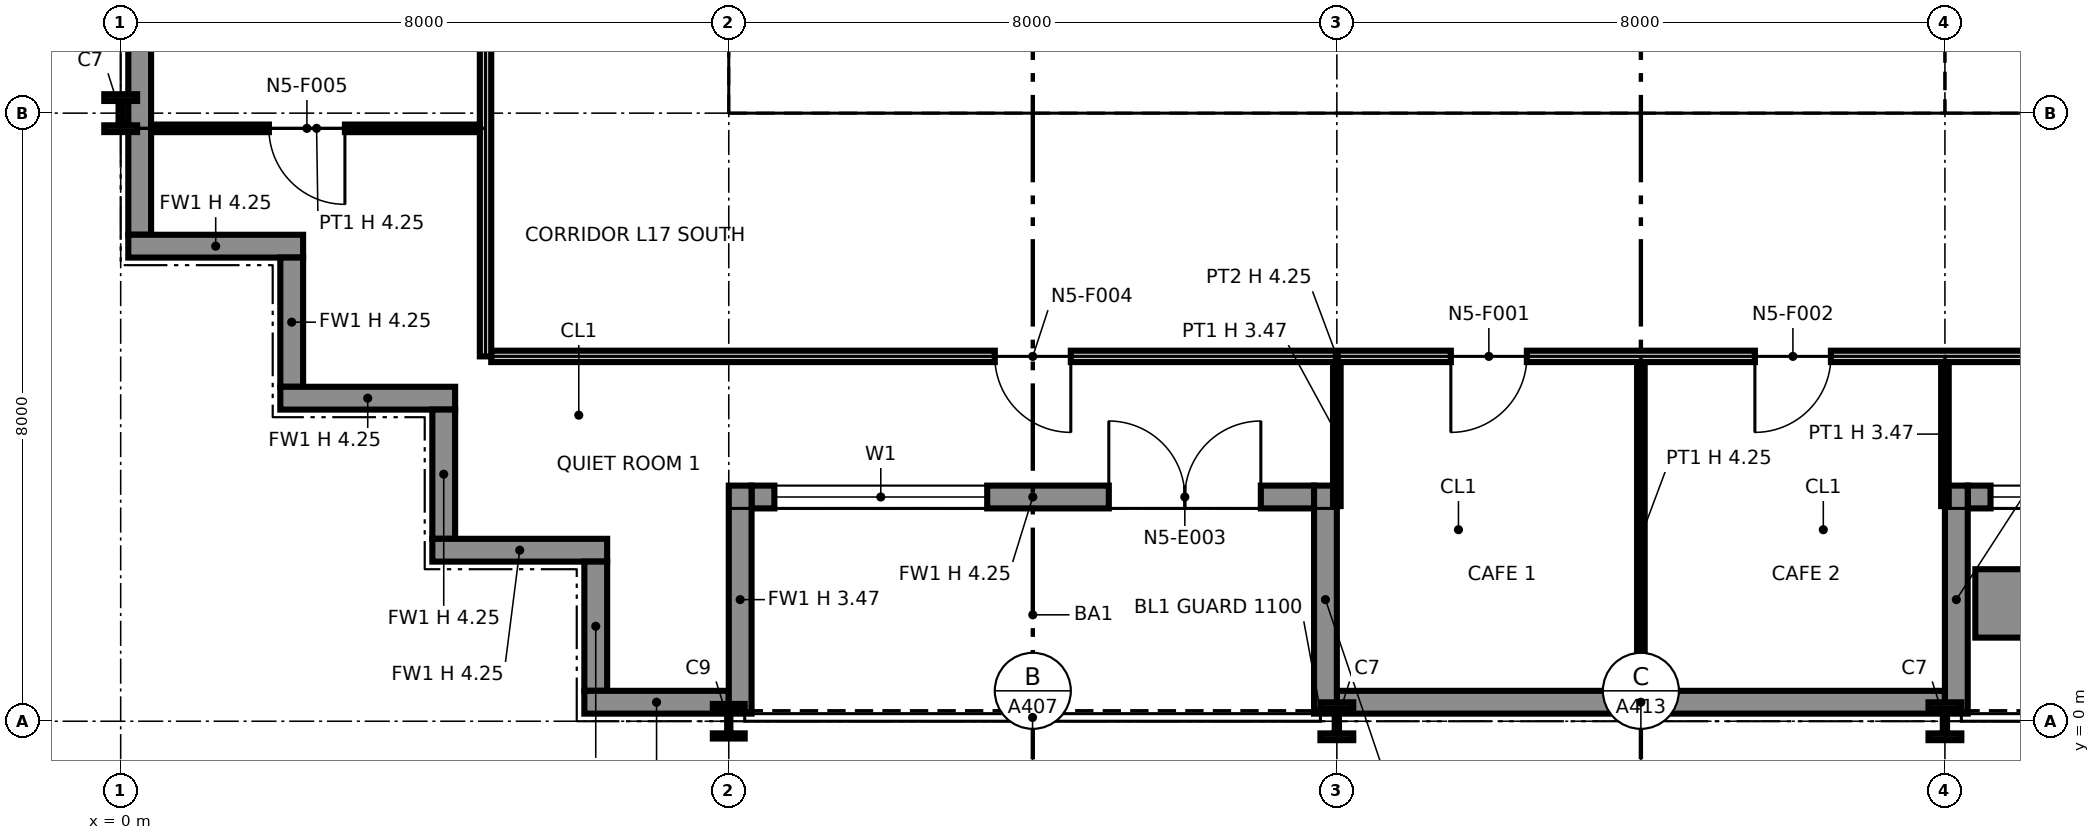
"""IFC4 building model, lengths in metres.
Left out: names, types, materials, properties, quantities, classifications, styles, units other than length and angle.
Written with IfcOpenShell. Run it as: python <this file> out.ifc"""

import sys

from ifc_helpers import new_model, si_unit, direction, frame, frame_2d, origin, origin_2d, place, context, subcontext, project, spatial, polyline, rectangle, i_section, outline, extrude, element, fill, save


model = new_model("IFC4")
c1 = context("Model", 3, precision=1e-05, world=origin(), true_north=direction((0.0, 1.0)))
c2 = subcontext(c1, "Body", "Model", "MODEL_VIEW")
j1 = project(units=[si_unit("LENGTHUNIT", "METRE"), si_unit("PLANEANGLEUNIT", "RADIAN")], contexts=[c1])
p1 = place(None, origin())
s1 = spatial("IfcSite", under=j1, at=p1, CompositionType="ELEMENT")
p2 = place(p1, origin())
s2 = spatial("IfcBuilding", under=s1, at=p2, CompositionType="ELEMENT")
p3 = place(p2, frame((0.0, 0.0, 92.0)))
s3 = spatial("IfcBuildingStorey", under=s2, at=p3, CompositionType="ELEMENT", Elevation=92.0)
p4 = place(p3, frame((0.0, 8.0, 0.0), z_axis=(0.0, 0.0, 1.0), x_axis=(1.0, 0.0, 0.0)))
e1 = element("IfcColumn", 1, at=p4, inside=s3, PredefinedType="COLUMN", context=c2, shape_type="SweptSolid", body=[
    extrude(i_section(OverallWidth=0.432, OverallDepth=0.498, WebThickness=0.056, FlangeThickness=0.089, at=origin_2d()), origin(), (0.0, 0.0, 1.0), 4.25),
])
p5 = place(p3, frame((8.0, 0.0, 0.0), z_axis=(0.0, 0.0, 1.0), x_axis=(1.0, 0.0, 0.0)))
e2 = element("IfcColumn", 2, at=p5, inside=s3, PredefinedType="COLUMN", context=c2, shape_type="SweptSolid", body=[
    extrude(i_section(OverallWidth=0.419, OverallDepth=0.455, WebThickness=0.042, FlangeThickness=0.068, at=origin_2d()), origin(), (0.0, 0.0, 1.0), 4.25),
])
p6 = place(p3, frame((8.0, 8.0, 0.0), z_axis=(0.0, 0.0, 1.0), x_axis=(1.0, 0.0, 0.0)))
e3 = element("IfcColumn", 3, at=p6, inside=s3, PredefinedType="COLUMN", context=c2, shape_type="SweptSolid", body=[
    extrude(i_section(OverallWidth=0.406, OverallDepth=0.417, WebThickness=0.03, FlangeThickness=0.048, at=origin_2d()), origin(), (0.0, 0.0, 1.0), 4.25),
])
p7 = place(p3, frame((16.0, 0.0, 0.0), z_axis=(0.0, 0.0, 1.0), x_axis=(1.0, 0.0, 0.0)))
e4 = element("IfcColumn", 4, at=p7, inside=s3, PredefinedType="COLUMN", context=c2, shape_type="SweptSolid", body=[
    extrude(i_section(OverallWidth=0.432, OverallDepth=0.498, WebThickness=0.056, FlangeThickness=0.089, at=origin_2d()), origin(), (0.0, 0.0, 1.0), 4.25),
])
p8 = place(p3, frame((16.0, 8.0, 0.0), z_axis=(0.0, 0.0, 1.0), x_axis=(1.0, 0.0, 0.0)))
e5 = element("IfcColumn", 5, at=p8, inside=s3, PredefinedType="COLUMN", context=c2, shape_type="SweptSolid", body=[
    extrude(i_section(OverallWidth=0.406, OverallDepth=0.417, WebThickness=0.03, FlangeThickness=0.048, at=origin_2d()), origin(), (0.0, 0.0, 1.0), 4.25),
])
p9 = place(p3, frame((24.0, 0.0, 0.0), z_axis=(0.0, 0.0, 1.0), x_axis=(1.0, 0.0, 0.0)))
e6 = element("IfcColumn", 6, at=p9, inside=s3, PredefinedType="COLUMN", context=c2, shape_type="SweptSolid", body=[
    extrude(i_section(OverallWidth=0.432, OverallDepth=0.498, WebThickness=0.056, FlangeThickness=0.089, at=origin_2d()), origin(), (0.0, 0.0, 1.0), 4.25),
])
p10 = place(p3, frame((24.0, 8.0, 0.0), z_axis=(0.0, 0.0, 1.0), x_axis=(1.0, 0.0, 0.0)))
e7 = element("IfcColumn", 7, at=p10, inside=s3, PredefinedType="COLUMN", context=c2, shape_type="SweptSolid", body=[
    extrude(i_section(OverallWidth=0.411, OverallDepth=0.434, WebThickness=0.036, FlangeThickness=0.057, at=origin_2d()), origin(), (0.0, 0.0, 1.0), 4.25),
])
p11 = place(p3, frame((0.25, 16.0, 0.0), z_axis=(0.0, 0.0, 1.0), x_axis=(0.0, -1.0, 0.0)))
e8 = element("IfcWall", 8, at=p11, inside=s3, PredefinedType="SOLIDWALL", context=c2, shape_type="SweptSolid", body=[
    extrude(rectangle(XDim=9.6, YDim=0.3, at=frame_2d((4.8, 0.0))), origin(), (0.0, 0.0, 1.0), 4.25),
])
p12 = place(p3, frame((0.1, 6.25, 0.0), z_axis=(0.0, 0.0, 1.0), x_axis=(1.0, 0.0, 0.0)))
e9 = element("IfcWall", 9, at=p12, inside=s3, PredefinedType="SOLIDWALL", context=c2, shape_type="SweptSolid", body=[
    extrude(rectangle(XDim=2.3, YDim=0.3, at=frame_2d((1.15, 0.0))), origin(), (0.0, 0.0, 1.0), 4.25),
])
p13 = place(p3, frame((2.25, 6.1, 0.0), z_axis=(0.0, 0.0, 1.0), x_axis=(0.0, -1.0, 0.0)))
e10 = element("IfcWall", 10, at=p13, inside=s3, PredefinedType="SOLIDWALL", context=c2, shape_type="SweptSolid", body=[
    extrude(rectangle(XDim=1.7, YDim=0.3, at=frame_2d((0.85, 0.0))), origin(), (0.0, 0.0, 1.0), 4.25),
])
p14 = place(p3, frame((2.1, 4.25, 0.0), z_axis=(0.0, 0.0, 1.0), x_axis=(1.0, 0.0, 0.0)))
e11 = element("IfcWall", 11, at=p14, inside=s3, PredefinedType="SOLIDWALL", context=c2, shape_type="SweptSolid", body=[
    extrude(rectangle(XDim=2.3, YDim=0.3, at=frame_2d((1.15, 0.0))), origin(), (0.0, 0.0, 1.0), 4.25),
])
p15 = place(p3, frame((4.25, 4.1, 0.0), z_axis=(0.0, 0.0, 1.0), x_axis=(0.0, -1.0, 0.0)))
e12 = element("IfcWall", 12, at=p15, inside=s3, PredefinedType="SOLIDWALL", context=c2, shape_type="SweptSolid", body=[
    extrude(rectangle(XDim=1.7, YDim=0.3, at=frame_2d((0.85, 0.0))), origin(), (0.0, 0.0, 1.0), 4.25),
])
p16 = place(p3, frame((4.1, 2.25, 0.0), z_axis=(0.0, 0.0, 1.0), x_axis=(1.0, 0.0, 0.0)))
e13 = element("IfcWall", 13, at=p16, inside=s3, PredefinedType="SOLIDWALL", context=c2, shape_type="SweptSolid", body=[
    extrude(rectangle(XDim=2.3, YDim=0.3, at=frame_2d((1.15, 0.0))), origin(), (0.0, 0.0, 1.0), 4.25),
])
p17 = place(p3, frame((6.25, 2.1, 0.0), z_axis=(0.0, 0.0, 1.0), x_axis=(0.0, -1.0, 0.0)))
e14 = element("IfcWall", 14, at=p17, inside=s3, PredefinedType="SOLIDWALL", context=c2, shape_type="SweptSolid", body=[
    extrude(rectangle(XDim=1.7, YDim=0.3, at=frame_2d((0.85, 0.0))), origin(), (0.0, 0.0, 1.0), 4.25),
])
p18 = place(p3, frame((6.1, 0.25, 0.0), z_axis=(0.0, 0.0, 1.0), x_axis=(1.0, 0.0, 0.0)))
e15 = element("IfcWall", 15, at=p18, inside=s3, PredefinedType="SOLIDWALL", context=c2, shape_type="SweptSolid", body=[
    extrude(rectangle(XDim=1.9, YDim=0.3, at=frame_2d((0.95, 0.0))), origin(), (0.0, 0.0, 1.0), 4.25),
])
p19 = place(p3, frame((8.3, 2.95, 0.0), z_axis=(0.0, 0.0, 1.0), x_axis=(1.0, 0.0, 0.0)))
e16 = element("IfcWall", 16, at=p19, inside=s3, PredefinedType="SOLIDWALL", context=c2, shape_type="SweptSolid", body=[
    extrude(rectangle(XDim=7.4, YDim=0.3, at=frame_2d((3.7, 0.0))), origin(), (0.0, 0.0, 1.0), 4.25),
])
p20 = place(p19, frame((0.3, 0.0, 0.9)))
e17 = element("IfcOpeningElement", 17, at=p20, cuts=e16, PredefinedType="OPENING", context=c2, shape_type="SweptSolid", body=[
    extrude(rectangle(XDim=2.8, YDim=2.2, at=frame_2d((1.4, 1.1))), frame((0.0, 0.16, 0.0), z_axis=(0.0, -1.0, 0.0), x_axis=(1.0, 0.0, 0.0)), (0.0, 0.0, 1.0), 0.32),
])
p21 = place(p19, frame((4.7, 0.0, 0.0)))
e18 = element("IfcOpeningElement", 18, at=p21, cuts=e16, PredefinedType="OPENING", context=c2, shape_type="SweptSolid", body=[
    extrude(rectangle(XDim=2.0, YDim=2.4, at=frame_2d((1.0, 1.2))), frame((0.0, 0.16, 0.0), z_axis=(0.0, -1.0, 0.0), x_axis=(1.0, 0.0, 0.0)), (0.0, 0.0, 1.0), 0.32),
])
p22 = place(p3, frame((8.15, 0.1, 0.0), z_axis=(0.0, 0.0, 1.0), x_axis=(0.0, 1.0, 0.0)))
e19 = element("IfcWall", 19, at=p22, inside=s3, PredefinedType="SOLIDWALL", context=c2, shape_type="SweptSolid", body=[
    extrude(rectangle(XDim=3.0, YDim=0.3, at=frame_2d((1.5, 0.0))), origin(), (0.0, 0.0, 1.0), 3.469),
])
p23 = place(p3, frame((15.85, 0.1, 0.0), z_axis=(0.0, 0.0, 1.0), x_axis=(0.0, 1.0, 0.0)))
e20 = element("IfcWall", 20, at=p23, inside=s3, PredefinedType="SOLIDWALL", context=c2, shape_type="SweptSolid", body=[
    extrude(rectangle(XDim=3.0, YDim=0.3, at=frame_2d((1.5, 0.0))), origin(), (0.0, 0.0, 1.0), 3.556),
])
p24 = place(p3, frame((16.0, 0.25, 0.0), z_axis=(0.0, 0.0, 1.0), x_axis=(1.0, 0.0, 0.0)))
e21 = element("IfcWall", 21, at=p24, inside=s3, PredefinedType="SOLIDWALL", context=c2, shape_type="SweptSolid", body=[
    extrude(rectangle(XDim=8.0, YDim=0.3, at=frame_2d((4.0, 0.0))), origin(), (0.0, 0.0, 1.0), 4.25),
])
p25 = place(p3, frame((24.3, 2.95, 0.0), z_axis=(0.0, 0.0, 1.0), x_axis=(1.0, 0.0, 0.0)))
e22 = element("IfcWall", 22, at=p25, inside=s3, PredefinedType="SOLIDWALL", context=c2, shape_type="SweptSolid", body=[
    extrude(rectangle(XDim=7.4, YDim=0.3, at=frame_2d((3.7, 0.0))), origin(), (0.0, 0.0, 1.0), 4.25),
])
p26 = place(p25, frame((0.3, 0.0, 0.9)))
e23 = element("IfcOpeningElement", 23, at=p26, cuts=e22, PredefinedType="OPENING", context=c2, shape_type="SweptSolid", body=[
    extrude(rectangle(XDim=2.8, YDim=2.2, at=frame_2d((1.4, 1.1))), frame((0.0, 0.16, 0.0), z_axis=(0.0, -1.0, 0.0), x_axis=(1.0, 0.0, 0.0)), (0.0, 0.0, 1.0), 0.32),
])
p27 = place(p25, frame((4.7, 0.0, 0.0)))
e24 = element("IfcOpeningElement", 24, at=p27, cuts=e22, PredefinedType="OPENING", context=c2, shape_type="SweptSolid", body=[
    extrude(rectangle(XDim=2.0, YDim=2.4, at=frame_2d((1.0, 1.2))), frame((0.0, 0.16, 0.0), z_axis=(0.0, -1.0, 0.0), x_axis=(1.0, 0.0, 0.0)), (0.0, 0.0, 1.0), 0.32),
])
p28 = place(p3, frame((24.15, 0.1, 0.0), z_axis=(0.0, 0.0, 1.0), x_axis=(0.0, 1.0, 0.0)))
e25 = element("IfcWall", 25, at=p28, inside=s3, PredefinedType="SOLIDWALL", context=c2, shape_type="SweptSolid", body=[
    extrude(rectangle(XDim=3.0, YDim=0.3, at=frame_2d((1.5, 0.0))), origin(), (0.0, 0.0, 1.0), 3.556),
])
p29 = place(p3, frame((24.4, 1.55, 0.0), z_axis=(0.0, 0.0, 1.0), x_axis=(1.0, 0.0, 0.0)))
e26 = element("IfcWall", 26, at=p29, inside=s3, PredefinedType="SOLIDWALL", context=c2, shape_type="SweptSolid", body=[
    extrude(rectangle(XDim=3.2, YDim=0.9, at=frame_2d((1.6, 0.0))), origin(), (0.0, 0.0, 1.0), 0.6),
])
p30 = place(p3, frame((8.65, 8.75, 0.0), z_axis=(0.0, 0.0, 1.0), x_axis=(1.0, 0.0, 0.0)))
e27 = element("IfcWall", 27, at=p30, inside=s3, PredefinedType="PARTITIONING", context=c2, shape_type="SweptSolid", body=[
    extrude(outline(polyline([(0.0, 0.0), (14.7, 0.0), (14.7, 4.25), (7.469, 4.25), (7.469, 3.632), (7.231, 3.632), (7.23, 4.25), (0.0, 4.25), (0.0, 0.0)])), frame((0.0, 0.1, 0.0), z_axis=(0.0, -1.0, 0.0), x_axis=(1.0, 0.0, 0.0)), (0.0, 0.0, 1.0), 0.2),
])
p31 = place(p30, frame((1.3, 0.0, 0.0)))
e28 = element("IfcOpeningElement", 28, at=p31, cuts=e27, PredefinedType="OPENING", context=c2, shape_type="SweptSolid", body=[
    extrude(rectangle(XDim=1.4, YDim=2.1, at=frame_2d((0.7, 1.05))), frame((0.0, 0.11, 0.0), z_axis=(0.0, -1.0, 0.0), x_axis=(1.0, 0.0, 0.0)), (0.0, 0.0, 1.0), 0.22),
])
p32 = place(p30, frame((4.6, 0.0, 0.0)))
e29 = element("IfcOpeningElement", 29, at=p32, cuts=e27, PredefinedType="OPENING", context=c2, shape_type="SweptSolid", body=[
    extrude(rectangle(XDim=1.4, YDim=2.1, at=frame_2d((0.7, 1.05))), frame((0.0, 0.11, 0.0), z_axis=(0.0, -1.0, 0.0), x_axis=(1.0, 0.0, 0.0)), (0.0, 0.0, 1.0), 0.22),
])
p33 = place(p30, frame((10.4, 0.0, 0.0)))
e30 = element("IfcOpeningElement", 30, at=p33, cuts=e27, PredefinedType="OPENING", context=c2, shape_type="SweptSolid", body=[
    extrude(rectangle(XDim=1.2, YDim=2.1, at=frame_2d((0.6, 1.05))), frame((0.0, 0.11, 0.0), z_axis=(0.0, -1.0, 0.0), x_axis=(1.0, 0.0, 0.0)), (0.0, 0.0, 1.0), 0.22),
])
p34 = place(p3, frame((24.65, 8.75, 0.0), z_axis=(0.0, 0.0, 1.0), x_axis=(1.0, 0.0, 0.0)))
e31 = element("IfcWall", 31, at=p34, inside=s3, PredefinedType="PARTITIONING", context=c2, shape_type="SweptSolid", body=[
    extrude(outline(polyline([(0.0, 0.0), (14.7, 0.0), (14.7, 4.25), (7.469, 4.25), (7.469, 3.632), (7.231, 3.632), (7.23, 4.25), (0.0, 4.25), (0.0, 0.0)])), frame((0.0, 0.1, 0.0), z_axis=(0.0, -1.0, 0.0), x_axis=(1.0, 0.0, 0.0)), (0.0, 0.0, 1.0), 0.2),
])
p35 = place(p3, frame((20.0, 0.13, 0.0), z_axis=(0.0, 0.0, 1.0), x_axis=(0.0, 1.0, 0.0)))
e32 = element("IfcWall", 32, at=p35, inside=s3, PredefinedType="PARTITIONING", context=c2, shape_type="SweptSolid", body=[
    extrude(outline(polyline([(0.0, 0.0), (4.595, 0.0), (4.595, 4.25), (4.17, 4.25), (4.168, 3.47), (3.572, 3.47), (3.57, 4.25), (0.0, 4.25), (0.0, 0.0)])), frame((0.0, 0.05, 0.0), z_axis=(0.0, -1.0, 0.0), x_axis=(1.0, 0.0, 0.0)), (0.0, 0.0, 1.0), 0.1),
])
for number, where, z_axis, x_axis in (
    (33, (16.0, 2.83, 0.0), (0.0, 0.0, 1.0), (0.0, 1.0, 0.0)),
    (34, (24.0, 2.83, 0.0), (0.0, 0.0, 1.0), (0.0, 1.0, 0.0)),
):
    element("IfcWall", number, at=place(p3, frame(where, z_axis=z_axis, x_axis=x_axis)), inside=s3, PredefinedType="PARTITIONING", context=c2, shape_type="SweptSolid", body=[
        extrude(rectangle(XDim=1.895, YDim=0.1, at=frame_2d((0.948, 0.0))), origin(), (0.0, 0.0, 1.0), 3.47),
    ])
p36 = place(p3, frame((4.875, 4.8, 0.0), z_axis=(0.0, 0.0, 1.0), x_axis=(1.0, 0.0, 0.0)))
e35 = element("IfcWall", 35, at=p36, inside=s3, PredefinedType="PARTITIONING", context=c2, shape_type="SweptSolid", body=[
    extrude(rectangle(XDim=22.25, YDim=0.15, at=frame_2d((11.125, 0.0))), origin(), (0.0, 0.0, 1.0), 4.25),
])
p37 = place(p36, frame((13.625, 0.0, 0.0), z_axis=(0.0, 0.0, 1.0), x_axis=(-1.0, 0.0, 0.0)))
e36 = element("IfcOpeningElement", 36, at=p37, cuts=e35, PredefinedType="OPENING", context=c2, shape_type="SweptSolid", body=[
    extrude(rectangle(XDim=1.0, YDim=2.1, at=frame_2d((0.5, 1.05))), frame((0.0, 0.085, 0.0), z_axis=(0.0, -1.0, 0.0), x_axis=(1.0, 0.0, 0.0)), (0.0, 0.0, 1.0), 0.17),
])
p38 = place(p36, frame((17.625, 0.0, 0.0), z_axis=(0.0, 0.0, 1.0), x_axis=(-1.0, 0.0, 0.0)))
e37 = element("IfcOpeningElement", 37, at=p38, cuts=e35, PredefinedType="OPENING", context=c2, shape_type="SweptSolid", body=[
    extrude(rectangle(XDim=1.0, YDim=2.1, at=frame_2d((0.5, 1.05))), frame((0.0, 0.085, 0.0), z_axis=(0.0, -1.0, 0.0), x_axis=(1.0, 0.0, 0.0)), (0.0, 0.0, 1.0), 0.17),
])
p39 = place(p36, frame((7.625, 0.0, 0.0), z_axis=(0.0, 0.0, 1.0), x_axis=(-1.0, 0.0, 0.0)))
e38 = element("IfcOpeningElement", 38, at=p39, cuts=e35, PredefinedType="OPENING", context=c2, shape_type="SweptSolid", body=[
    extrude(rectangle(XDim=1.0, YDim=2.1, at=frame_2d((0.5, 1.05))), frame((0.0, 0.085, 0.0), z_axis=(0.0, -1.0, 0.0), x_axis=(1.0, 0.0, 0.0)), (0.0, 0.0, 1.0), 0.17),
])
p40 = place(p3, frame((4.8, 4.8, 0.0), z_axis=(0.0, 0.0, 1.0), x_axis=(0.0, 1.0, 0.0)))
e39 = element("IfcWall", 39, at=p40, inside=s3, PredefinedType="PARTITIONING", context=c2, shape_type="SweptSolid", body=[
    extrude(outline(polyline([(0.0, 0.0), (14.575, 0.0), (14.575, 4.25), (11.5, 4.25), (11.498, 3.47), (10.902, 3.47), (10.9, 4.25), (7.5, 4.25), (7.498, 3.47), (6.902, 3.47), (6.9, 4.25), (3.5, 4.25), (3.498, 3.47), (2.902, 3.47), (2.9, 4.25), (0.0, 4.25), (0.0, 0.0)])), frame((0.0, 0.075, 0.0), z_axis=(0.0, -1.0, 0.0), x_axis=(1.0, 0.0, 0.0)), (0.0, 0.0, 1.0), 0.15),
])
p41 = place(p40, frame((12.425, 0.0, 0.0)))
e40 = element("IfcOpeningElement", 40, at=p41, cuts=e39, PredefinedType="OPENING", context=c2, shape_type="SweptSolid", body=[
    extrude(rectangle(XDim=1.0, YDim=2.1, at=frame_2d((0.5, 1.05))), frame((0.0, 0.085, 0.0), z_axis=(0.0, -1.0, 0.0), x_axis=(1.0, 0.0, 0.0)), (0.0, 0.0, 1.0), 0.17),
])
p42 = place(p3, frame((0.43, 7.8, 0.0), z_axis=(0.0, 0.0, 1.0), x_axis=(1.0, 0.0, 0.0)))
e41 = element("IfcWall", 41, at=p42, inside=s3, PredefinedType="PARTITIONING", context=c2, shape_type="SweptSolid", body=[
    extrude(rectangle(XDim=4.295, YDim=0.1, at=frame_2d((2.147, 0.0))), origin(), (0.0, 0.0, 1.0), 4.25),
])
p43 = place(p42, frame((2.52, 0.0, 0.0), z_axis=(0.0, 0.0, 1.0), x_axis=(-1.0, 0.0, 0.0)))
e42 = element("IfcOpeningElement", 42, at=p43, cuts=e41, PredefinedType="OPENING", context=c2, shape_type="SweptSolid", body=[
    extrude(rectangle(XDim=1.0, YDim=2.1, at=frame_2d((0.5, 1.05))), frame((0.0, 0.06, 0.0), z_axis=(0.0, -1.0, 0.0), x_axis=(1.0, 0.0, 0.0)), (0.0, 0.0, 1.0), 0.12),
])
p44 = place(p20, origin())
e43 = element("IfcWindow", 43, at=p44, inside=s3, PartitioningType="SINGLE_PANEL", PredefinedType="WINDOW", context=c2, shape_type="SweptSolid", body=[
    extrude(rectangle(XDim=2.8, YDim=2.2, at=frame_2d((1.4, 1.1))), frame((0.0, 0.03, 0.0), z_axis=(0.0, -1.0, 0.0), x_axis=(1.0, 0.0, 0.0)), (0.0, 0.0, 1.0), 0.06),
])
fill(e17, e43)
p45 = place(p21, origin())
e44 = element("IfcDoor", 44, at=p45, inside=s3, OperationType="DOUBLE_DOOR_SINGLE_SWING", PredefinedType="DOOR", context=c2, shape_type="SweptSolid", body=[
    extrude(rectangle(XDim=2.0, YDim=2.4, at=frame_2d((1.0, 1.2))), frame((0.0, 0.025, 0.0), z_axis=(0.0, -1.0, 0.0), x_axis=(1.0, 0.0, 0.0)), (0.0, 0.0, 1.0), 0.05),
])
fill(e18, e44)
p46 = place(p26, origin())
e45 = element("IfcWindow", 45, at=p46, inside=s3, PartitioningType="SINGLE_PANEL", PredefinedType="WINDOW", context=c2, shape_type="SweptSolid", body=[
    extrude(rectangle(XDim=2.8, YDim=2.2, at=frame_2d((1.4, 1.1))), frame((0.0, 0.03, 0.0), z_axis=(0.0, -1.0, 0.0), x_axis=(1.0, 0.0, 0.0)), (0.0, 0.0, 1.0), 0.06),
])
fill(e23, e45)
p47 = place(p31, origin())
e46 = element("IfcDoor", 46, at=p47, inside=s3, OperationType="DOUBLE_DOOR_SINGLE_SWING", PredefinedType="NOTDEFINED", context=c2, shape_type="SweptSolid", body=[
    extrude(rectangle(XDim=1.4, YDim=2.1, at=frame_2d((0.7, 1.05))), frame((0.0, 0.025, 0.0), z_axis=(0.0, -1.0, 0.0), x_axis=(1.0, 0.0, 0.0)), (0.0, 0.0, 1.0), 0.05),
])
fill(e28, e46)
p48 = place(p32, origin())
e47 = element("IfcDoor", 47, at=p48, inside=s3, OperationType="DOUBLE_DOOR_SINGLE_SWING", PredefinedType="NOTDEFINED", context=c2, shape_type="SweptSolid", body=[
    extrude(rectangle(XDim=1.4, YDim=2.1, at=frame_2d((0.7, 1.05))), frame((0.0, 0.025, 0.0), z_axis=(0.0, -1.0, 0.0), x_axis=(1.0, 0.0, 0.0)), (0.0, 0.0, 1.0), 0.05),
])
fill(e29, e47)
p49 = place(p33, origin())
e48 = element("IfcDoor", 48, at=p49, inside=s3, OperationType="SINGLE_SWING_LEFT", PredefinedType="NOTDEFINED", context=c2, shape_type="SweptSolid", body=[
    extrude(rectangle(XDim=1.2, YDim=2.1, at=frame_2d((0.6, 1.05))), frame((0.0, 0.025, 0.0), z_axis=(0.0, -1.0, 0.0), x_axis=(1.0, 0.0, 0.0)), (0.0, 0.0, 1.0), 0.05),
])
fill(e30, e48)
p50 = place(p37, origin())
e49 = element("IfcDoor", 49, at=p50, inside=s3, OperationType="SINGLE_SWING_RIGHT", PredefinedType="DOOR", context=c2, shape_type="SweptSolid", body=[
    extrude(rectangle(XDim=1.0, YDim=2.1, at=frame_2d((0.5, 1.05))), frame((0.0, 0.025, 0.0), z_axis=(0.0, -1.0, 0.0), x_axis=(1.0, 0.0, 0.0)), (0.0, 0.0, 1.0), 0.05),
])
fill(e36, e49)
p51 = place(p38, origin())
e50 = element("IfcDoor", 50, at=p51, inside=s3, OperationType="SINGLE_SWING_RIGHT", PredefinedType="DOOR", context=c2, shape_type="SweptSolid", body=[
    extrude(rectangle(XDim=1.0, YDim=2.1, at=frame_2d((0.5, 1.05))), frame((0.0, 0.025, 0.0), z_axis=(0.0, -1.0, 0.0), x_axis=(1.0, 0.0, 0.0)), (0.0, 0.0, 1.0), 0.05),
])
fill(e37, e50)
p52 = place(p39, origin())
e51 = element("IfcDoor", 51, at=p52, inside=s3, OperationType="SINGLE_SWING_LEFT", PredefinedType="DOOR", context=c2, shape_type="SweptSolid", body=[
    extrude(rectangle(XDim=1.0, YDim=2.1, at=frame_2d((0.5, 1.05))), frame((0.0, 0.025, 0.0), z_axis=(0.0, -1.0, 0.0), x_axis=(1.0, 0.0, 0.0)), (0.0, 0.0, 1.0), 0.05),
])
fill(e38, e51)
p53 = place(p43, origin())
e52 = element("IfcDoor", 52, at=p53, inside=s3, OperationType="SINGLE_SWING_LEFT", PredefinedType="DOOR", context=c2, shape_type="SweptSolid", body=[
    extrude(rectangle(XDim=1.0, YDim=2.1, at=frame_2d((0.5, 1.05))), frame((0.0, 0.025, 0.0), z_axis=(0.0, -1.0, 0.0), x_axis=(1.0, 0.0, 0.0)), (0.0, 0.0, 1.0), 0.05),
])
fill(e42, e52)
save(model, sys.argv[1])
